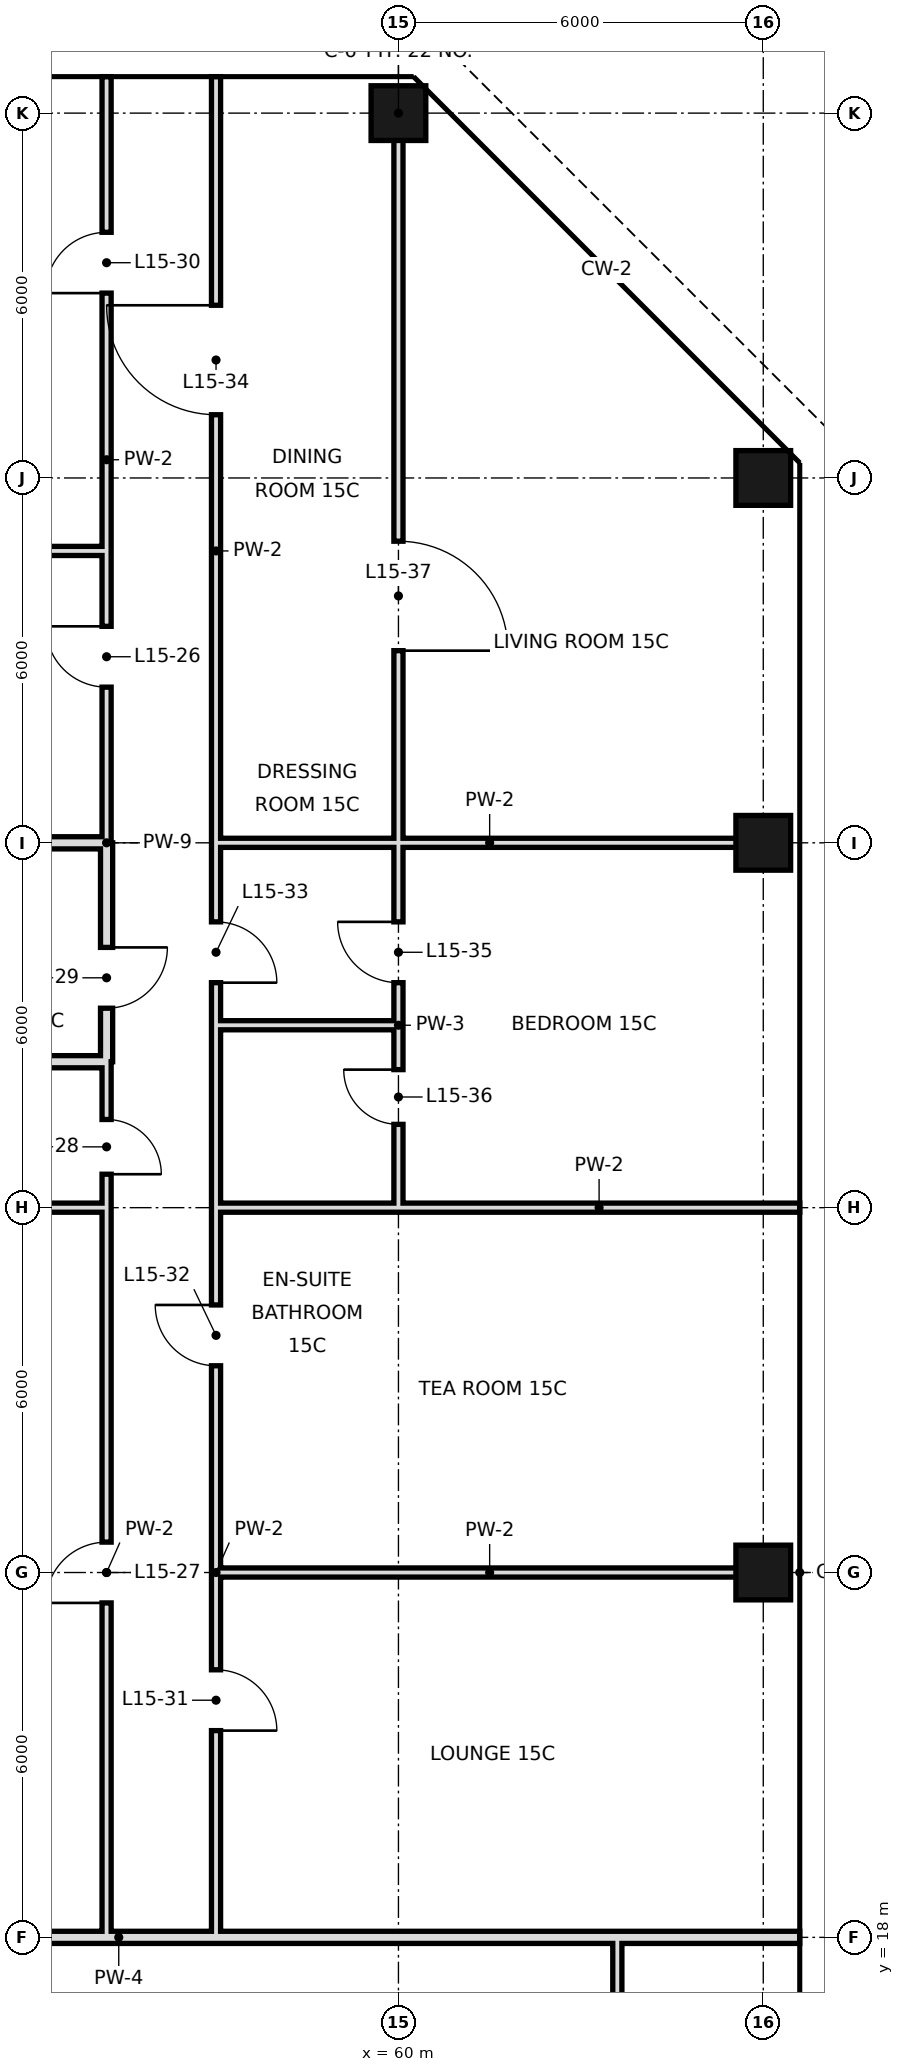
"""IFC4 building model, lengths in metres.
Left out: names, types, materials, properties, quantities, classifications, styles, units other than length and angle.
Written with IfcOpenShell. Run it as: python <this file> out.ifc"""

import sys

from ifc_helpers import new_model, si_unit, direction, frame, frame_2d, origin, origin_2d, place, context, subcontext, project, spatial, rectangle, hollow_rectangle, extrude, element, fill, save


model = new_model("IFC4")
c1 = context("Model", 3, precision=1e-05, world=origin(), true_north=direction((0.0, 1.0)))
c2 = subcontext(c1, "Body", "Model", "MODEL_VIEW")
j1 = project(units=[si_unit("LENGTHUNIT", "METRE"), si_unit("PLANEANGLEUNIT", "RADIAN")], contexts=[c1])
p1 = place(None, origin())
s1 = spatial("IfcSite", under=j1, at=p1, CompositionType="ELEMENT")
p2 = place(p1, origin())
s2 = spatial("IfcBuilding", under=s1, at=p2, CompositionType="ELEMENT")
p3 = place(p2, frame((0.0, 0.0, 75.0)))
s3 = spatial("IfcBuildingStorey", under=s2, at=p3, CompositionType="ELEMENT", Elevation=75.0)
for number, where, z_axis, x_axis in (
    (1, (60.0, 48.0, 0.0), (0.0, 0.0, 1.0), (1.0, 0.0, 0.0)),
    (2, (66.0, 24.0, 0.0), (0.0, 0.0, 1.0), (1.0, 0.0, 0.0)),
    (3, (66.0, 36.0, 0.0), (0.0, 0.0, 1.0), (1.0, 0.0, 0.0)),
    (4, (66.0, 42.0, 0.0), (0.0, 0.0, 1.0), (1.0, 0.0, 0.0)),
):
    element("IfcColumn", number, at=place(p3, frame(where, z_axis=z_axis, x_axis=x_axis)), inside=s3, PredefinedType="COLUMN", context=c2, shape_type="SweptSolid", body=[
        extrude(hollow_rectangle(XDim=0.9, YDim=0.9, WallThickness=0.045, at=origin_2d()), origin(), (0.0, 0.0, 1.0), 3.6),
    ])
p4 = place(p3, frame((55.2, 32.4, 0.0), z_axis=(0.0, 0.0, 1.0), x_axis=(0.0, 1.0, 0.0)))
e5 = element("IfcWall", 5, at=p4, inside=s3, PredefinedType="SOLIDWALL", context=c2, shape_type="SweptSolid", body=[
    extrude(rectangle(XDim=3.6, YDim=0.2, at=frame_2d((1.8, 0.0))), origin(), (0.0, 0.0, 1.0), 2.52),
])
p5 = place(p4, frame((0.88, 0.0, 0.0)))
e6 = element("IfcOpeningElement", 6, at=p5, cuts=e5, PredefinedType="OPENING", context=c2, shape_type="SweptSolid", body=[
    extrude(rectangle(XDim=1.0, YDim=2.4, at=frame_2d((0.5, 1.2))), frame((0.0, 0.11, 0.0), z_axis=(0.0, -1.0, 0.0), x_axis=(1.0, 0.0, 0.0)), (0.0, 0.0, 1.0), 0.22),
])
p6 = place(p3, frame((55.2, 18.0, 0.0), z_axis=(0.0, 0.0, 1.0), x_axis=(0.0, 1.0, 0.0)))
e7 = element("IfcWall", 7, at=p6, inside=s3, PredefinedType="PARTITIONING", context=c2, shape_type="SweptSolid", body=[
    extrude(rectangle(XDim=12.0, YDim=0.15, at=frame_2d((6.0, 0.0))), origin(), (0.0, 0.0, 1.0), 3.42),
])
p7 = place(p6, frame((5.5, 0.0, 0.0)))
e8 = element("IfcOpeningElement", 8, at=p7, cuts=e7, PredefinedType="OPENING", context=c2, shape_type="SweptSolid", body=[
    extrude(rectangle(XDim=1.0, YDim=2.4, at=frame_2d((0.5, 1.2))), frame((0.0, 0.085, 0.0), z_axis=(0.0, -1.0, 0.0), x_axis=(1.0, 0.0, 0.0)), (0.0, 0.0, 1.0), 0.17),
])
p8 = place(p3, frame((55.2, 36.0, 0.0), z_axis=(0.0, 0.0, 1.0), x_axis=(0.0, 1.0, 0.0)))
e9 = element("IfcWall", 9, at=p8, inside=s3, PredefinedType="PARTITIONING", context=c2, shape_type="SweptSolid", body=[
    extrude(rectangle(XDim=12.6, YDim=0.15, at=frame_2d((6.3, 0.0))), origin(), (0.0, 0.0, 1.0), 3.42),
])
p9 = place(p8, frame((2.56, 0.0, 0.0)))
e10 = element("IfcOpeningElement", 10, at=p9, cuts=e9, PredefinedType="OPENING", context=c2, shape_type="SweptSolid", body=[
    extrude(rectangle(XDim=1.0, YDim=2.4, at=frame_2d((0.5, 1.2))), frame((0.0, 0.085, 0.0), z_axis=(0.0, -1.0, 0.0), x_axis=(1.0, 0.0, 0.0)), (0.0, 0.0, 1.0), 0.17),
])
p10 = place(p8, frame((9.04, 0.0, 0.0)))
e11 = element("IfcOpeningElement", 11, at=p10, cuts=e9, PredefinedType="OPENING", context=c2, shape_type="SweptSolid", body=[
    extrude(rectangle(XDim=1.0, YDim=2.4, at=frame_2d((0.5, 1.2))), frame((0.0, 0.085, 0.0), z_axis=(0.0, -1.0, 0.0), x_axis=(1.0, 0.0, 0.0)), (0.0, 0.0, 1.0), 0.17),
])
p11 = place(p3, frame((55.2, 30.0, 0.0), z_axis=(0.0, 0.0, 1.0), x_axis=(0.0, 1.0, 0.0)))
e12 = element("IfcWall", 12, at=p11, inside=s3, PredefinedType="PARTITIONING", context=c2, shape_type="SweptSolid", body=[
    extrude(rectangle(XDim=2.4, YDim=0.15, at=frame_2d((1.2, 0.0))), origin(), (0.0, 0.0, 1.0), 3.42),
])
p12 = place(p11, frame((0.55, 0.0, 0.0)))
e13 = element("IfcOpeningElement", 13, at=p12, cuts=e12, PredefinedType="OPENING", context=c2, shape_type="SweptSolid", body=[
    extrude(rectangle(XDim=0.9, YDim=2.4, at=frame_2d((0.45, 1.2))), frame((0.0, 0.085, 0.0), z_axis=(0.0, -1.0, 0.0), x_axis=(1.0, 0.0, 0.0)), (0.0, 0.0, 1.0), 0.17),
])
p13 = place(p3, frame((57.0, 18.0, 0.0), z_axis=(0.0, 0.0, 1.0), x_axis=(0.0, 1.0, 0.0)))
e14 = element("IfcWall", 14, at=p13, inside=s3, PredefinedType="PARTITIONING", context=c2, shape_type="SweptSolid", body=[
    extrude(rectangle(XDim=12.0, YDim=0.15, at=frame_2d((6.0, 0.0))), origin(), (0.0, 0.0, 1.0), 3.42),
])
p14 = place(p13, frame((3.4, 0.0, 0.0)))
e15 = element("IfcOpeningElement", 15, at=p14, cuts=e14, PredefinedType="OPENING", context=c2, shape_type="SweptSolid", body=[
    extrude(rectangle(XDim=1.0, YDim=2.4, at=frame_2d((0.5, 1.2))), frame((0.0, 0.085, 0.0), z_axis=(0.0, -1.0, 0.0), x_axis=(1.0, 0.0, 0.0)), (0.0, 0.0, 1.0), 0.17),
])
p15 = place(p13, frame((9.4, 0.0, 0.0)))
e16 = element("IfcOpeningElement", 16, at=p15, cuts=e14, PredefinedType="OPENING", context=c2, shape_type="SweptSolid", body=[
    extrude(rectangle(XDim=1.0, YDim=2.4, at=frame_2d((0.5, 1.2))), frame((0.0, 0.085, 0.0), z_axis=(0.0, -1.0, 0.0), x_axis=(1.0, 0.0, 0.0)), (0.0, 0.0, 1.0), 0.17),
])
p16 = place(p3, frame((57.0, 33.0, 0.0), z_axis=(0.0, 0.0, 1.0), x_axis=(0.0, 1.0, 0.0)))
e17 = element("IfcWall", 17, at=p16, inside=s3, PredefinedType="PARTITIONING", context=c2, shape_type="SweptSolid", body=[
    extrude(rectangle(XDim=15.6, YDim=0.15, at=frame_2d((7.8, 0.0))), origin(), (0.0, 0.0, 1.0), 3.42),
])
p17 = place(p16, frame((0.7, 0.0, 0.0)))
e18 = element("IfcOpeningElement", 18, at=p17, cuts=e17, PredefinedType="OPENING", context=c2, shape_type="SweptSolid", body=[
    extrude(rectangle(XDim=1.0, YDim=2.4, at=frame_2d((0.5, 1.2))), frame((0.0, 0.085, 0.0), z_axis=(0.0, -1.0, 0.0), x_axis=(1.0, 0.0, 0.0)), (0.0, 0.0, 1.0), 0.17),
])
p18 = place(p16, frame((10.04, 0.0, 0.0)))
e19 = element("IfcOpeningElement", 19, at=p18, cuts=e17, PredefinedType="OPENING", context=c2, shape_type="SweptSolid", body=[
    extrude(rectangle(XDim=1.8, YDim=2.4, at=frame_2d((0.9, 1.2))), frame((0.0, 0.085, 0.0), z_axis=(0.0, -1.0, 0.0), x_axis=(1.0, 0.0, 0.0)), (0.0, 0.0, 1.0), 0.17),
])
p19 = place(p3, frame((57.0, 30.0, 0.0), z_axis=(0.0, 0.0, 1.0), x_axis=(0.0, 1.0, 0.0)))
e20 = element("IfcWall", 20, at=p19, inside=s3, PredefinedType="PARTITIONING", context=c2, shape_type="SweptSolid", body=[
    extrude(rectangle(XDim=3.0, YDim=0.15, at=frame_2d((1.5, 0.0))), origin(), (0.0, 0.0, 1.0), 3.42),
])
p20 = place(p3, frame((60.0, 33.0, 0.0), z_axis=(0.0, 0.0, 1.0), x_axis=(0.0, 1.0, 0.0)))
e21 = element("IfcWall", 21, at=p20, inside=s3, PredefinedType="PARTITIONING", context=c2, shape_type="SweptSolid", body=[
    extrude(rectangle(XDim=15.0, YDim=0.15, at=frame_2d((7.5, 0.0))), origin(), (0.0, 0.0, 1.0), 3.42),
])
p21 = place(p20, frame((0.7, 0.0, 0.0)))
e22 = element("IfcOpeningElement", 22, at=p21, cuts=e21, PredefinedType="OPENING", context=c2, shape_type="SweptSolid", body=[
    extrude(rectangle(XDim=1.0, YDim=2.4, at=frame_2d((0.5, 1.2))), frame((0.0, 0.085, 0.0), z_axis=(0.0, -1.0, 0.0), x_axis=(1.0, 0.0, 0.0)), (0.0, 0.0, 1.0), 0.17),
])
p22 = place(p20, frame((6.16, 0.0, 0.0)))
e23 = element("IfcOpeningElement", 23, at=p22, cuts=e21, PredefinedType="OPENING", context=c2, shape_type="SweptSolid", body=[
    extrude(rectangle(XDim=1.8, YDim=2.4, at=frame_2d((0.9, 1.2))), frame((0.0, 0.085, 0.0), z_axis=(0.0, -1.0, 0.0), x_axis=(1.0, 0.0, 0.0)), (0.0, 0.0, 1.0), 0.17),
])
p23 = place(p3, frame((60.0, 30.0, 0.0), z_axis=(0.0, 0.0, 1.0), x_axis=(0.0, 1.0, 0.0)))
e24 = element("IfcWall", 24, at=p23, inside=s3, PredefinedType="PARTITIONING", context=c2, shape_type="SweptSolid", body=[
    extrude(rectangle(XDim=3.0, YDim=0.15, at=frame_2d((1.5, 0.0))), origin(), (0.0, 0.0, 1.0), 3.42),
])
p24 = place(p23, frame((1.37, 0.0, 0.0)))
e25 = element("IfcOpeningElement", 25, at=p24, cuts=e24, PredefinedType="OPENING", context=c2, shape_type="SweptSolid", body=[
    extrude(rectangle(XDim=0.9, YDim=2.4, at=frame_2d((0.45, 1.2))), frame((0.0, 0.085, 0.0), z_axis=(0.0, -1.0, 0.0), x_axis=(1.0, 0.0, 0.0)), (0.0, 0.0, 1.0), 0.17),
])
p25 = place(p3, frame((63.6, 10.8, 0.0), z_axis=(0.0, 0.0, 1.0), x_axis=(0.0, 1.0, 0.0)))
e26 = element("IfcWall", 26, at=p25, inside=s3, PredefinedType="PARTITIONING", context=c2, shape_type="SweptSolid", body=[
    extrude(rectangle(XDim=7.2, YDim=0.15, at=frame_2d((3.6, 0.0))), origin(), (0.0, 0.0, 1.0), 3.42),
])
p26 = place(p3, frame((44.9, 18.0, 0.0), z_axis=(0.0, 0.0, 1.0), x_axis=(1.0, 0.0, 0.0)))
e27 = element("IfcWall", 27, at=p26, inside=s3, PredefinedType="SOLIDWALL", context=c2, shape_type="SweptSolid", body=[
    extrude(rectangle(XDim=21.7, YDim=0.2, at=frame_2d((10.85, 0.0))), origin(), (0.0, 0.0, 1.0), 2.52),
])
p27 = place(p3, frame((57.0, 24.0, 0.0), z_axis=(0.0, 0.0, 1.0), x_axis=(1.0, 0.0, 0.0)))
e28 = element("IfcWall", 28, at=p27, inside=s3, PredefinedType="PARTITIONING", context=c2, shape_type="SweptSolid", body=[
    extrude(rectangle(XDim=9.0, YDim=0.15, at=frame_2d((4.5, 0.0))), origin(), (0.0, 0.0, 1.0), 2.52),
])
p28 = place(p3, frame((60.0, 30.0, 0.0), z_axis=(0.0, 0.0, 1.0), x_axis=(1.0, 0.0, 0.0)))
e29 = element("IfcWall", 29, at=p28, inside=s3, PredefinedType="PARTITIONING", context=c2, shape_type="SweptSolid", body=[
    extrude(rectangle(XDim=6.6, YDim=0.15, at=frame_2d((3.3, 0.0))), origin(), (0.0, 0.0, 1.0), 2.52),
])
p29 = place(p3, frame((44.9, 30.0, 0.0), z_axis=(0.0, 0.0, 1.0), x_axis=(1.0, 0.0, 0.0)))
e30 = element("IfcWall", 30, at=p29, inside=s3, PredefinedType="PARTITIONING", context=c2, shape_type="SweptSolid", body=[
    extrude(rectangle(XDim=10.3, YDim=0.15, at=frame_2d((5.15, 0.0))), origin(), (0.0, 0.0, 1.0), 2.52),
])
p30 = place(p3, frame((57.0, 30.0, 0.0), z_axis=(0.0, 0.0, 1.0), x_axis=(1.0, 0.0, 0.0)))
e31 = element("IfcWall", 31, at=p30, inside=s3, PredefinedType="PARTITIONING", context=c2, shape_type="SweptSolid", body=[
    extrude(rectangle(XDim=3.0, YDim=0.15, at=frame_2d((1.5, 0.0))), origin(), (0.0, 0.0, 1.0), 2.52),
])
p31 = place(p3, frame((44.9, 32.4, 0.0), z_axis=(0.0, 0.0, 1.0), x_axis=(1.0, 0.0, 0.0)))
e32 = element("IfcWall", 32, at=p31, inside=s3, PredefinedType="SOLIDWALL", context=c2, shape_type="SweptSolid", body=[
    extrude(rectangle(XDim=10.3, YDim=0.2, at=frame_2d((5.15, 0.0))), origin(), (0.0, 0.0, 1.0), 2.97),
])
p32 = place(p3, frame((57.0, 33.0, 0.0), z_axis=(0.0, 0.0, 1.0), x_axis=(1.0, 0.0, 0.0)))
e33 = element("IfcWall", 33, at=p32, inside=s3, PredefinedType="PARTITIONING", context=c2, shape_type="SweptSolid", body=[
    extrude(rectangle(XDim=3.0, YDim=0.15, at=frame_2d((1.5, 0.0))), origin(), (0.0, 0.0, 1.0), 3.42),
])
p33 = place(p3, frame((44.9, 36.0, 0.0), z_axis=(0.0, 0.0, 1.0), x_axis=(1.0, 0.0, 0.0)))
e34 = element("IfcWall", 34, at=p33, inside=s3, PredefinedType="SOLIDWALL", context=c2, shape_type="SweptSolid", body=[
    extrude(rectangle(XDim=10.3, YDim=0.2, at=frame_2d((5.15, 0.0))), origin(), (0.0, 0.0, 1.0), 2.52),
])
p34 = place(p3, frame((57.0, 36.0, 0.0), z_axis=(0.0, 0.0, 1.0), x_axis=(1.0, 0.0, 0.0)))
e35 = element("IfcWall", 35, at=p34, inside=s3, PredefinedType="PARTITIONING", context=c2, shape_type="SweptSolid", body=[
    extrude(rectangle(XDim=9.0, YDim=0.15, at=frame_2d((4.5, 0.0))), origin(), (0.0, 0.0, 1.0), 2.52),
])
p35 = place(p3, frame((44.9, 40.8, 0.0), z_axis=(0.0, 0.0, 1.0), x_axis=(1.0, 0.0, 0.0)))
e36 = element("IfcWall", 36, at=p35, inside=s3, PredefinedType="PARTITIONING", context=c2, shape_type="SweptSolid", body=[
    extrude(rectangle(XDim=10.3, YDim=0.15, at=frame_2d((5.15, 0.0))), origin(), (0.0, 0.0, 1.0), 3.42),
])
p36 = place(p9, frame((1.0, 0.0, 0.0), z_axis=(0.0, 0.0, 1.0), x_axis=(-1.0, 0.0, 0.0)))
e37 = element("IfcDoor", 37, at=p36, inside=s3, OperationType="SINGLE_SWING_LEFT", PredefinedType="DOOR", context=c2, shape_type="SweptSolid", body=[
    extrude(rectangle(XDim=1.0, YDim=2.4, at=frame_2d((0.5, 1.2))), frame((0.0, 0.025, 0.0), z_axis=(0.0, -1.0, 0.0), x_axis=(1.0, 0.0, 0.0)), (0.0, 0.0, 1.0), 0.05),
])
fill(e10, e37)
p37 = place(p7, origin())
e38 = element("IfcDoor", 38, at=p37, inside=s3, OperationType="SINGLE_SWING_LEFT", PredefinedType="DOOR", context=c2, shape_type="SweptSolid", body=[
    extrude(rectangle(XDim=1.0, YDim=2.4, at=frame_2d((0.5, 1.2))), frame((0.0, 0.025, 0.0), z_axis=(0.0, -1.0, 0.0), x_axis=(1.0, 0.0, 0.0)), (0.0, 0.0, 1.0), 0.05),
])
fill(e8, e38)
p38 = place(p12, frame((0.9, 0.0, 0.0), z_axis=(0.0, 0.0, 1.0), x_axis=(-1.0, 0.0, 0.0)))
e39 = element("IfcDoor", 39, at=p38, inside=s3, OperationType="SINGLE_SWING_RIGHT", PredefinedType="DOOR", context=c2, shape_type="SweptSolid", body=[
    extrude(rectangle(XDim=0.9, YDim=2.4, at=frame_2d((0.45, 1.2))), frame((0.0, 0.025, 0.0), z_axis=(0.0, -1.0, 0.0), x_axis=(1.0, 0.0, 0.0)), (0.0, 0.0, 1.0), 0.05),
])
fill(e13, e39)
p39 = place(p5, origin())
e40 = element("IfcDoor", 40, at=p39, inside=s3, OperationType="SINGLE_SWING_RIGHT", PredefinedType="DOOR", context=c2, shape_type="SweptSolid", body=[
    extrude(rectangle(XDim=1.0, YDim=2.4, at=frame_2d((0.5, 1.2))), frame((0.0, 0.025, 0.0), z_axis=(0.0, -1.0, 0.0), x_axis=(1.0, 0.0, 0.0)), (0.0, 0.0, 1.0), 0.05),
])
fill(e6, e40)
p40 = place(p10, origin())
e41 = element("IfcDoor", 41, at=p40, inside=s3, OperationType="SINGLE_SWING_LEFT", PredefinedType="DOOR", context=c2, shape_type="SweptSolid", body=[
    extrude(rectangle(XDim=1.0, YDim=2.4, at=frame_2d((0.5, 1.2))), frame((0.0, 0.025, 0.0), z_axis=(0.0, -1.0, 0.0), x_axis=(1.0, 0.0, 0.0)), (0.0, 0.0, 1.0), 0.05),
])
fill(e11, e41)
p41 = place(p14, frame((1.0, 0.0, 0.0), z_axis=(0.0, 0.0, 1.0), x_axis=(-1.0, 0.0, 0.0)))
e42 = element("IfcDoor", 42, at=p41, inside=s3, OperationType="SINGLE_SWING_RIGHT", PredefinedType="DOOR", context=c2, shape_type="SweptSolid", body=[
    extrude(rectangle(XDim=1.0, YDim=2.4, at=frame_2d((0.5, 1.2))), frame((0.0, 0.025, 0.0), z_axis=(0.0, -1.0, 0.0), x_axis=(1.0, 0.0, 0.0)), (0.0, 0.0, 1.0), 0.05),
])
fill(e15, e42)
p42 = place(p15, frame((1.0, 0.0, 0.0), z_axis=(0.0, 0.0, 1.0), x_axis=(-1.0, 0.0, 0.0)))
e43 = element("IfcDoor", 43, at=p42, inside=s3, OperationType="SINGLE_SWING_LEFT", PredefinedType="DOOR", context=c2, shape_type="SweptSolid", body=[
    extrude(rectangle(XDim=1.0, YDim=2.4, at=frame_2d((0.5, 1.2))), frame((0.0, 0.025, 0.0), z_axis=(0.0, -1.0, 0.0), x_axis=(1.0, 0.0, 0.0)), (0.0, 0.0, 1.0), 0.05),
])
fill(e16, e43)
p43 = place(p17, frame((1.0, 0.0, 0.0), z_axis=(0.0, 0.0, 1.0), x_axis=(-1.0, 0.0, 0.0)))
e44 = element("IfcDoor", 44, at=p43, inside=s3, OperationType="SINGLE_SWING_RIGHT", PredefinedType="DOOR", context=c2, shape_type="SweptSolid", body=[
    extrude(rectangle(XDim=1.0, YDim=2.4, at=frame_2d((0.5, 1.2))), frame((0.0, 0.025, 0.0), z_axis=(0.0, -1.0, 0.0), x_axis=(1.0, 0.0, 0.0)), (0.0, 0.0, 1.0), 0.05),
])
fill(e18, e44)
p44 = place(p18, frame((1.8, 0.0, 0.0), z_axis=(0.0, 0.0, 1.0), x_axis=(-1.0, 0.0, 0.0)))
e45 = element("IfcDoor", 45, at=p44, inside=s3, OperationType="SINGLE_SWING_LEFT", PredefinedType="DOOR", context=c2, shape_type="SweptSolid", body=[
    extrude(rectangle(XDim=1.8, YDim=2.4, at=frame_2d((0.9, 1.2))), frame((0.0, 0.025, 0.0), z_axis=(0.0, -1.0, 0.0), x_axis=(1.0, 0.0, 0.0)), (0.0, 0.0, 1.0), 0.05),
])
fill(e19, e45)
p45 = place(p21, frame((1.0, 0.0, 0.0), z_axis=(0.0, 0.0, 1.0), x_axis=(-1.0, 0.0, 0.0)))
e46 = element("IfcDoor", 46, at=p45, inside=s3, OperationType="SINGLE_SWING_LEFT", PredefinedType="DOOR", context=c2, shape_type="SweptSolid", body=[
    extrude(rectangle(XDim=1.0, YDim=2.4, at=frame_2d((0.5, 1.2))), frame((0.0, 0.025, 0.0), z_axis=(0.0, -1.0, 0.0), x_axis=(1.0, 0.0, 0.0)), (0.0, 0.0, 1.0), 0.05),
])
fill(e22, e46)
p46 = place(p24, frame((0.9, 0.0, 0.0), z_axis=(0.0, 0.0, 1.0), x_axis=(-1.0, 0.0, 0.0)))
e47 = element("IfcDoor", 47, at=p46, inside=s3, OperationType="SINGLE_SWING_LEFT", PredefinedType="DOOR", context=c2, shape_type="SweptSolid", body=[
    extrude(rectangle(XDim=0.9, YDim=2.4, at=frame_2d((0.45, 1.2))), frame((0.0, 0.025, 0.0), z_axis=(0.0, -1.0, 0.0), x_axis=(1.0, 0.0, 0.0)), (0.0, 0.0, 1.0), 0.05),
])
fill(e25, e47)
p47 = place(p22, frame((1.8, 0.0, 0.0), z_axis=(0.0, 0.0, 1.0), x_axis=(-1.0, 0.0, 0.0)))
e48 = element("IfcDoor", 48, at=p47, inside=s3, OperationType="SINGLE_SWING_RIGHT", PredefinedType="DOOR", context=c2, shape_type="SweptSolid", body=[
    extrude(rectangle(XDim=1.8, YDim=2.4, at=frame_2d((0.9, 1.2))), frame((0.0, 0.025, 0.0), z_axis=(0.0, -1.0, 0.0), x_axis=(1.0, 0.0, 0.0)), (0.0, 0.0, 1.0), 0.05),
])
fill(e23, e48)
save(model, sys.argv[1])
